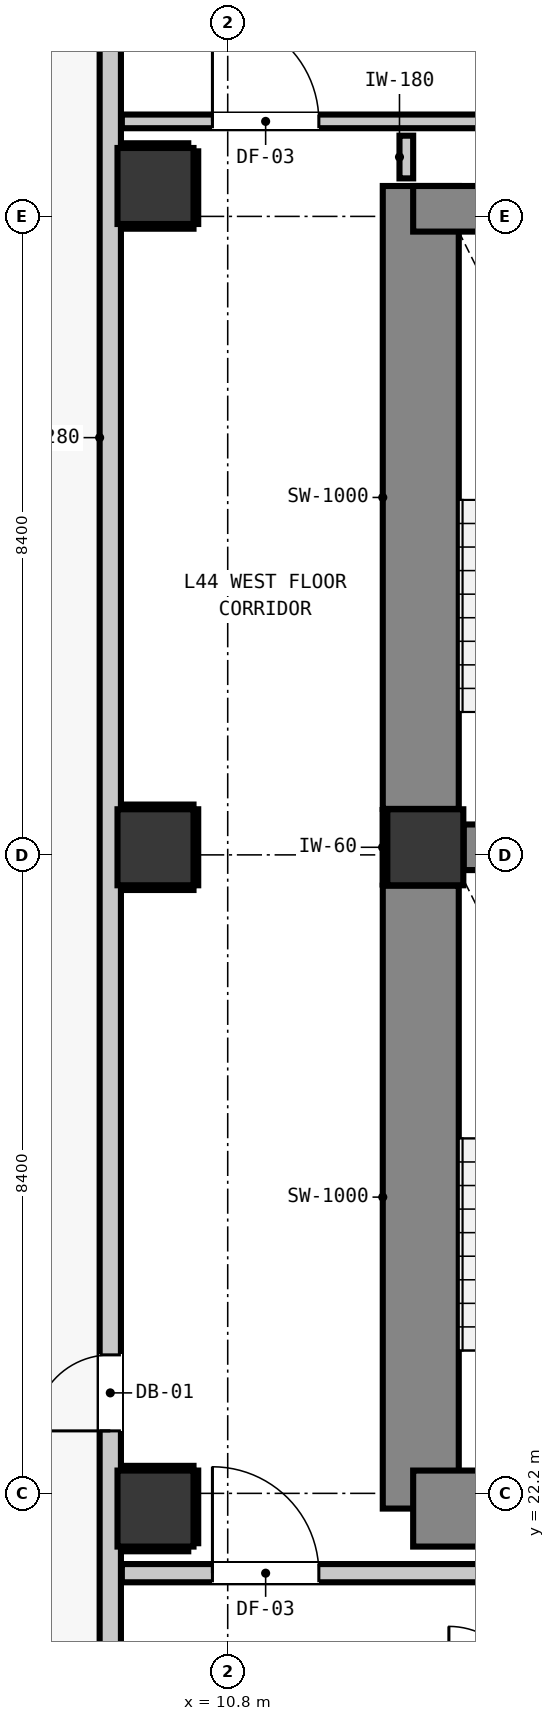
"""IFC4 building model, lengths in metres.
Left out: names, types, materials, properties, quantities, classifications, styles, units other than length and angle.
Written with IfcOpenShell. Run it as: python <this file> out.ifc"""

import sys

from ifc_helpers import new_model, si_unit, direction, frame, frame_2d, origin, origin_2d, place, context, subcontext, project, spatial, rectangle, extrude, element, fill, save


model = new_model("IFC4")
c1 = context("Model", 3, precision=1e-05, world=origin(), true_north=direction((0.0, 1.0)))
c2 = subcontext(c1, "Body", "Model", "MODEL_VIEW")
j1 = project(units=[si_unit("LENGTHUNIT", "METRE"), si_unit("PLANEANGLEUNIT", "RADIAN")], contexts=[c1])
p1 = place(None, origin())
s1 = spatial("IfcSite", under=j1, at=p1, CompositionType="ELEMENT")
p2 = place(p1, origin())
s2 = spatial("IfcBuilding", under=s1, at=p2, CompositionType="ELEMENT")
p3 = place(p2, frame((0.0, 0.0, 152.56)))
s3 = spatial("IfcBuildingStorey", under=s2, at=p3, CompositionType="ELEMENT", Elevation=152.56)
p4 = place(p3, frame((13.4, 30.7, 0.0), z_axis=(0.0, 0.0, 1.0), x_axis=(1.0, 0.0, 0.0)))
e1 = element("IfcColumn", 1, at=p4, inside=s3, PredefinedType="COLUMN", context=c2, shape_type="SweptSolid", body=[
    extrude(rectangle(XDim=1.0, YDim=1.0, at=origin_2d()), origin(), (0.0, 0.0, 1.0), 3.32),
])
p5 = place(p3, frame((13.34, 22.0, 0.0), z_axis=(0.0, 0.0, 1.0), x_axis=(0.0, 1.0, 0.0)))
e2 = element("IfcWall", 2, at=p5, inside=s3, PredefinedType="SHEAR", context=c2, shape_type="SweptSolid", body=[
    extrude(rectangle(XDim=8.195, YDim=1.0, at=frame_2d((4.098, 0.0))), origin(), (0.0, 0.0, 1.0), 3.32),
])
p6 = place(p3, frame((13.34, 31.205, 0.0), z_axis=(0.0, 0.0, 1.0), x_axis=(0.0, 1.0, 0.0)))
e3 = element("IfcWall", 3, at=p6, inside=s3, PredefinedType="SHEAR", context=c2, shape_type="SweptSolid", body=[
    extrude(rectangle(XDim=8.195, YDim=1.0, at=frame_2d((4.097, 0.0))), origin(), (0.0, 0.0, 1.0), 3.32),
])
p7 = place(p3, frame((13.24, 22.0, 0.0), z_axis=(0.0, 0.0, 1.0), x_axis=(1.0, 0.0, 0.0)))
e4 = element("IfcWall", 4, at=p7, inside=s3, PredefinedType="SHEAR", context=c2, shape_type="SweptSolid", body=[
    extrude(rectangle(XDim=4.08, YDim=1.0, at=frame_2d((2.04, 0.0))), origin(), (0.0, 0.0, 1.0), 3.32),
])
p8 = place(p3, frame((13.24, 39.1, 0.0), z_axis=(0.0, 0.0, 1.0), x_axis=(1.0, 0.0, 0.0)))
e5 = element("IfcWall", 5, at=p8, inside=s3, PredefinedType="SHEAR", context=c2, shape_type="SweptSolid", body=[
    extrude(rectangle(XDim=4.08, YDim=0.6, at=frame_2d((2.04, 0.0))), origin(), (0.0, 0.0, 1.0), 3.32),
])
p9 = place(p3, frame((13.905, 30.7, 0.0), z_axis=(0.0, 0.0, 1.0), x_axis=(1.0, 0.0, 0.0)))
e6 = element("IfcWall", 6, at=p9, inside=s3, PredefinedType="SHEAR", context=c2, shape_type="SweptSolid", body=[
    extrude(rectangle(XDim=3.415, YDim=0.6, at=frame_2d((1.708, 0.0))), origin(), (0.0, 0.0, 1.0), 3.32),
])
for number, where, z_axis, x_axis in (
    (7, (9.85, 22.0, 0.0), (0.0, 0.0, 1.0), (1.0, 0.0, 0.0)),
    (8, (9.85, 30.7, 0.0), (0.0, 0.0, 1.0), (1.0, 0.0, 0.0)),
    (9, (9.85, 39.4, 0.0), (0.0, 0.0, 1.0), (1.0, 0.0, 0.0)),
):
    element("IfcColumn", number, at=place(p3, frame(where, z_axis=z_axis, x_axis=x_axis)), inside=s3, PredefinedType="COLUMN", context=c2, shape_type="SweptSolid", body=[
        extrude(rectangle(XDim=1.0, YDim=1.0, at=origin_2d()), origin(), (0.0, 0.0, 1.0), 3.32),
    ])
p10 = place(p3, frame((9.255, 17.555, 0.0), z_axis=(0.0, 0.0, 1.0), x_axis=(0.0, 1.0, 0.0)))
e10 = element("IfcWall", 10, at=p10, inside=s3, PredefinedType="STANDARD", context=c2, shape_type="SweptSolid", body=[
    extrude(rectangle(XDim=32.29, YDim=0.28, at=frame_2d((16.145, 0.0))), origin(), (0.0, 0.0, 1.0), 3.08),
])
p11 = place(p10, frame((5.467, 0.0, 0.0)))
e11 = element("IfcOpeningElement", 11, at=p11, cuts=e10, PredefinedType="OPENING", context=c2, shape_type="SweptSolid", body=[
    extrude(rectangle(XDim=1.0, YDim=2.15, at=frame_2d((0.5, 1.075))), frame((0.0, 0.15, 0.0), z_axis=(0.0, -1.0, 0.0), x_axis=(1.0, 0.0, 0.0)), (0.0, 0.0, 1.0), 0.3),
])
p12 = place(p10, frame((30.602, 0.0, 0.85)))
e12 = element("IfcOpeningElement", 12, at=p12, cuts=e10, PredefinedType="OPENING", context=c2, shape_type="SweptSolid", body=[
    extrude(rectangle(XDim=1.35, YDim=1.85, at=frame_2d((0.675, 0.925))), frame((0.0, 0.15, 0.0), z_axis=(0.0, -1.0, 0.0), x_axis=(1.0, 0.0, 0.0)), (0.0, 0.0, 1.0), 0.3),
])
p13 = place(p3, frame((9.407, 21.15, 0.0), z_axis=(0.0, 0.0, 1.0), x_axis=(1.0, 0.0, 0.0)))
e13 = element("IfcWall", 13, at=p13, inside=s3, PredefinedType="PARTITIONING", context=c2, shape_type="SweptSolid", body=[
    extrude(rectangle(XDim=27.532, YDim=0.24, at=frame_2d((13.766, 0.0))), origin(), (0.0, 0.0, 1.0), 3.08),
])
p14 = place(p13, frame((8.803, 0.0, 0.0)))
e14 = element("IfcOpeningElement", 14, at=p14, cuts=e13, PredefinedType="OPENING", context=c2, shape_type="SweptSolid", body=[
    extrude(rectangle(XDim=1.1, YDim=2.15, at=frame_2d((0.55, 1.075))), frame((0.0, 0.13, 0.0), z_axis=(0.0, -1.0, 0.0), x_axis=(1.0, 0.0, 0.0)), (0.0, 0.0, 1.0), 0.26),
])
p15 = place(p13, frame((1.192, 0.0, 0.0)))
e15 = element("IfcOpeningElement", 15, at=p15, cuts=e13, PredefinedType="OPENING", context=c2, shape_type="SweptSolid", body=[
    extrude(rectangle(XDim=1.4, YDim=2.15, at=frame_2d((0.7, 1.075))), frame((0.0, 0.13, 0.0), z_axis=(0.0, -1.0, 0.0), x_axis=(1.0, 0.0, 0.0)), (0.0, 0.0, 1.0), 0.26),
])
p16 = place(p3, frame((9.407, 40.25, 0.0), z_axis=(0.0, 0.0, 1.0), x_axis=(1.0, 0.0, 0.0)))
e16 = element("IfcWall", 16, at=p16, inside=s3, PredefinedType="PARTITIONING", context=c2, shape_type="SweptSolid", body=[
    extrude(rectangle(XDim=39.386, YDim=0.18, at=frame_2d((19.693, 0.0))), origin(), (0.0, 0.0, 1.0), 3.08),
])
p17 = place(p16, frame((8.028, 0.0, 0.0)))
e17 = element("IfcOpeningElement", 17, at=p17, cuts=e16, PredefinedType="OPENING", context=c2, shape_type="SweptSolid", body=[
    extrude(rectangle(XDim=1.4, YDim=2.15, at=frame_2d((0.7, 1.075))), frame((0.0, 0.1, 0.0), z_axis=(0.0, -1.0, 0.0), x_axis=(1.0, 0.0, 0.0)), (0.0, 0.0, 1.0), 0.2),
])
p18 = place(p16, frame((1.192, 0.0, 0.0)))
e18 = element("IfcOpeningElement", 18, at=p18, cuts=e16, PredefinedType="OPENING", context=c2, shape_type="SweptSolid", body=[
    extrude(rectangle(XDim=1.4, YDim=2.15, at=frame_2d((0.7, 1.075))), frame((0.0, 0.1, 0.0), z_axis=(0.0, -1.0, 0.0), x_axis=(1.0, 0.0, 0.0)), (0.0, 0.0, 1.0), 0.2),
])
p19 = place(p16, frame((28.643, 0.0, 0.0)))
e19 = element("IfcOpeningElement", 19, at=p19, cuts=e16, PredefinedType="OPENING", context=c2, shape_type="SweptSolid", body=[
    extrude(rectangle(XDim=1.4, YDim=2.15, at=frame_2d((0.7, 1.075))), frame((0.0, 0.1, 0.0), z_axis=(0.0, -1.0, 0.0), x_axis=(1.0, 0.0, 0.0)), (0.0, 0.0, 1.0), 0.2),
])
p20 = place(p3, frame((13.15, 39.5, 0.0), z_axis=(0.0, 0.0, 1.0), x_axis=(0.0, 1.0, 0.0)))
e20 = element("IfcWall", 20, at=p20, inside=s3, PredefinedType="PARTITIONING", context=c2, shape_type="SweptSolid", body=[
    extrude(rectangle(XDim=0.562, YDim=0.18, at=frame_2d((0.281, 0.0))), origin(), (0.0, 0.0, 1.0), 2.315),
])
p21 = place(p3, frame((12.868, 30.21, 0.0), z_axis=(0.0, 0.0, 1.0), x_axis=(0.0, 1.0, 0.0)))
e21 = element("IfcWall", 21, at=p21, inside=s3, PredefinedType="PARTITIONING", context=c2, shape_type="SweptSolid", body=[
    extrude(rectangle(XDim=0.98, YDim=0.06, at=frame_2d((0.49, 0.0))), origin(), (0.0, 0.0, 1.0), 1.45),
])
p22 = place(p3, frame((9.41, 21.468, 0.0), z_axis=(0.0, 0.0, 1.0), x_axis=(1.0, 0.0, 0.0)))
e22 = element("IfcWall", 22, at=p22, inside=s3, PredefinedType="PARTITIONING", context=c2, shape_type="SweptSolid", body=[
    extrude(rectangle(XDim=0.871, YDim=0.06, at=frame_2d((0.436, 0.0))), origin(), (0.0, 0.0, 1.0), 1.45),
])
p23 = place(p3, frame((9.41, 22.532, 0.0), z_axis=(0.0, 0.0, 1.0), x_axis=(1.0, 0.0, 0.0)))
e23 = element("IfcWall", 23, at=p23, inside=s3, PredefinedType="PARTITIONING", context=c2, shape_type="SweptSolid", body=[
    extrude(rectangle(XDim=0.94, YDim=0.06, at=frame_2d((0.47, 0.0))), origin(), (0.0, 0.0, 1.0), 1.45),
])
p24 = place(p3, frame((10.382, 21.544, 0.0), z_axis=(0.0, 0.0, 1.0), x_axis=(0.0, 1.0, 0.0)))
e24 = element("IfcWall", 24, at=p24, inside=s3, PredefinedType="PARTITIONING", context=c2, shape_type="SweptSolid", body=[
    extrude(rectangle(XDim=0.956, YDim=0.06, at=frame_2d((0.478, 0.0))), origin(), (0.0, 0.0, 1.0), 1.45),
])
for number, where, z_axis, x_axis in (
    (25, (9.41, 30.168, 0.0), (0.0, 0.0, 1.0), (1.0, 0.0, 0.0)),
    (26, (9.41, 31.232, 0.0), (0.0, 0.0, 1.0), (1.0, 0.0, 0.0)),
):
    element("IfcWall", number, at=place(p3, frame(where, z_axis=z_axis, x_axis=x_axis)), inside=s3, PredefinedType="PARTITIONING", context=c2, shape_type="SweptSolid", body=[
        extrude(rectangle(XDim=0.94, YDim=0.06, at=frame_2d((0.47, 0.0))), origin(), (0.0, 0.0, 1.0), 1.45),
    ])
p25 = place(p3, frame((10.382, 30.2, 0.0), z_axis=(0.0, 0.0, 1.0), x_axis=(0.0, 1.0, 0.0)))
e27 = element("IfcWall", 27, at=p25, inside=s3, PredefinedType="PARTITIONING", context=c2, shape_type="SweptSolid", body=[
    extrude(rectangle(XDim=1.0, YDim=0.06, at=frame_2d((0.5, 0.0))), origin(), (0.0, 0.0, 1.0), 1.45),
])
p26 = place(p3, frame((9.41, 38.868, 0.0), z_axis=(0.0, 0.0, 1.0), x_axis=(1.0, 0.0, 0.0)))
e28 = element("IfcWall", 28, at=p26, inside=s3, PredefinedType="PARTITIONING", context=c2, shape_type="SweptSolid", body=[
    extrude(rectangle(XDim=0.94, YDim=0.06, at=frame_2d((0.47, 0.0))), origin(), (0.0, 0.0, 1.0), 1.45),
])
p27 = place(p3, frame((9.41, 39.932, 0.0), z_axis=(0.0, 0.0, 1.0), x_axis=(1.0, 0.0, 0.0)))
e29 = element("IfcWall", 29, at=p27, inside=s3, PredefinedType="PARTITIONING", context=c2, shape_type="SweptSolid", body=[
    extrude(rectangle(XDim=0.871, YDim=0.06, at=frame_2d((0.436, 0.0))), origin(), (0.0, 0.0, 1.0), 1.45),
])
p28 = place(p3, frame((10.382, 38.9, 0.0), z_axis=(0.0, 0.0, 1.0), x_axis=(0.0, 1.0, 0.0)))
e30 = element("IfcWall", 30, at=p28, inside=s3, PredefinedType="PARTITIONING", context=c2, shape_type="SweptSolid", body=[
    extrude(rectangle(XDim=0.956, YDim=0.06, at=frame_2d((0.478, 0.0))), origin(), (0.0, 0.0, 1.0), 1.45),
])
p29 = place(p11, origin())
e31 = element("IfcDoor", 31, at=p29, inside=s3, OperationType="SINGLE_SWING_LEFT", PredefinedType="DOOR", context=c2, shape_type="SweptSolid", body=[
    extrude(rectangle(XDim=1.0, YDim=2.15, at=frame_2d((0.5, 1.075))), frame((0.0, 0.025, 0.0), z_axis=(0.0, -1.0, 0.0), x_axis=(1.0, 0.0, 0.0)), (0.0, 0.0, 1.0), 0.05),
])
fill(e11, e31)
p30 = place(p15, origin())
e32 = element("IfcDoor", 32, at=p30, inside=s3, OperationType="SINGLE_SWING_LEFT", PredefinedType="DOOR", context=c2, shape_type="SweptSolid", body=[
    extrude(rectangle(XDim=1.4, YDim=2.15, at=frame_2d((0.7, 1.075))), frame((0.0, 0.025, 0.0), z_axis=(0.0, -1.0, 0.0), x_axis=(1.0, 0.0, 0.0)), (0.0, 0.0, 1.0), 0.05),
])
fill(e15, e32)
p31 = place(p18, origin())
e33 = element("IfcDoor", 33, at=p31, inside=s3, OperationType="SINGLE_SWING_LEFT", PredefinedType="DOOR", context=c2, shape_type="SweptSolid", body=[
    extrude(rectangle(XDim=1.4, YDim=2.15, at=frame_2d((0.7, 1.075))), frame((0.0, 0.025, 0.0), z_axis=(0.0, -1.0, 0.0), x_axis=(1.0, 0.0, 0.0)), (0.0, 0.0, 1.0), 0.05),
])
fill(e18, e33)
save(model, sys.argv[1])
